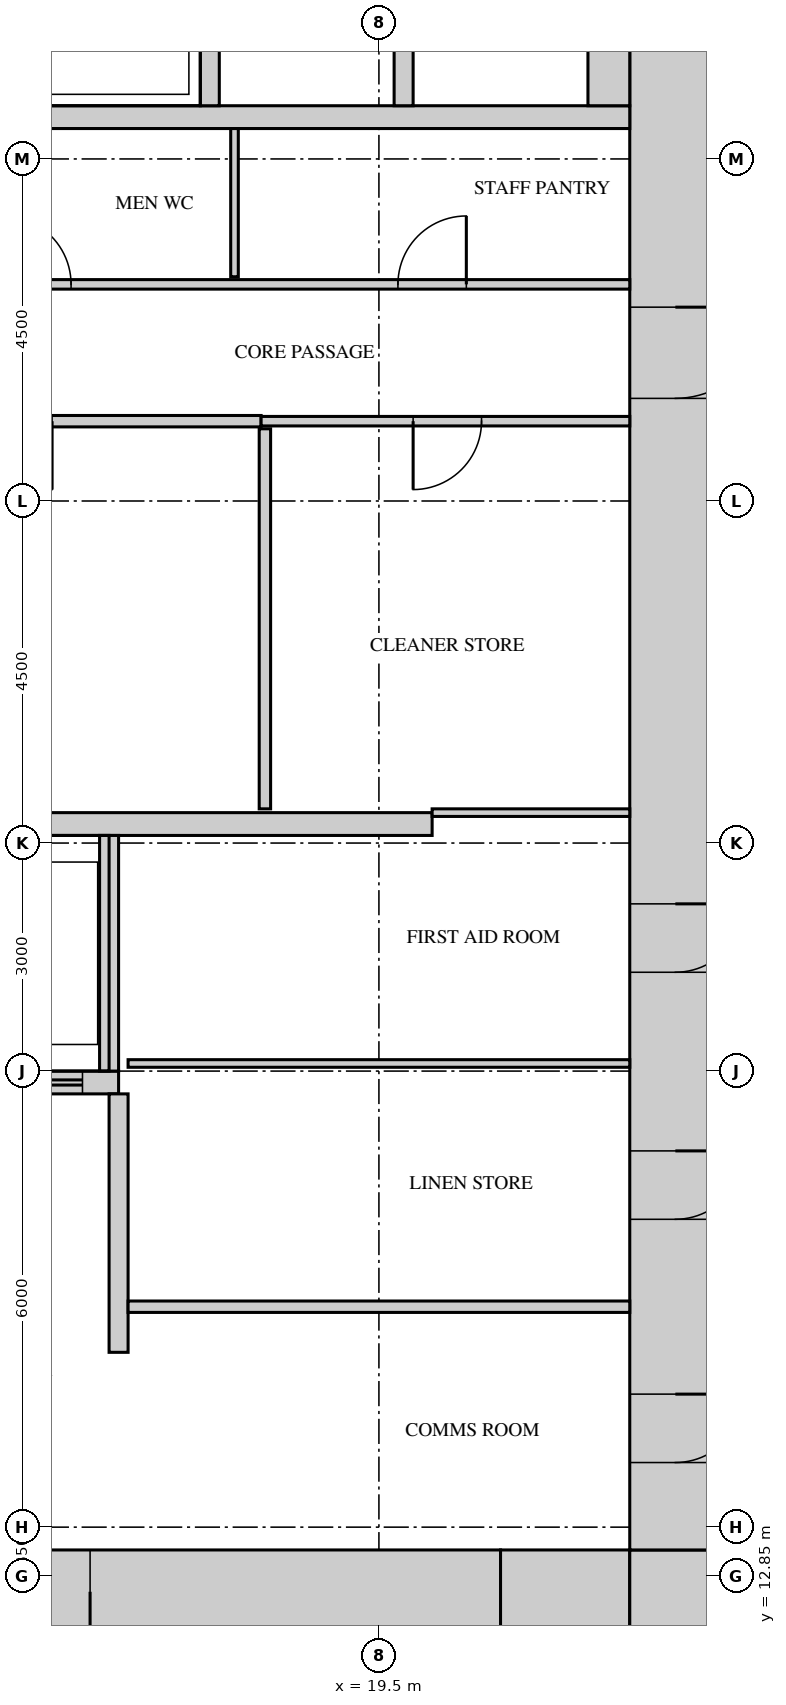
"""IFC4 building model, lengths in metres.
Left out: names, types, materials, properties, quantities, classifications, styles, units other than length and angle.
Written with IfcOpenShell. Run it as: python <this file> out.ifc"""

import sys

from ifc_helpers import new_model, si_unit, direction, frame, frame_2d, origin, place, context, subcontext, project, spatial, rectangle, extrude, source, transform, mapped, element, fill, save


model = new_model("IFC4")
c1 = context("Model", 3, precision=1e-05, world=origin(), true_north=direction((0.0, 1.0)))
c2 = subcontext(c1, "Body", "Model", "MODEL_VIEW")
j1 = project(units=[si_unit("LENGTHUNIT", "METRE"), si_unit("PLANEANGLEUNIT", "RADIAN")], contexts=[c1])
p1 = place(None, origin())
s1 = spatial("IfcSite", under=j1, at=p1, CompositionType="ELEMENT")
p2 = place(p1, origin())
s2 = spatial("IfcBuilding", under=s1, at=p2, CompositionType="ELEMENT")
p3 = place(p2, frame((0.0, 0.0, 46.5)))
s3 = spatial("IfcBuildingStorey", under=s2, at=p3, CompositionType="ELEMENT", Elevation=46.5)
m1 = source(origin(), c2, "Body", "SweptSolid", [
    extrude(rectangle(XDim=7.2, YDim=1.1, at=frame_2d((3.6, 0.0))), origin(), (0.0, 0.0, 1.0), 4.2),
])
p4 = place(p3, frame((13.9, 12.65, 0.0), z_axis=(0.0, 0.0, 1.0), x_axis=(1.0, 0.0, 0.0)))
e1 = element("IfcWall", 1, at=p4, inside=s3, PredefinedType="SHEAR", context=c2, shape_type="MappedRepresentation", body=[
    mapped(m1, transform((0.0, 0.0, 0.0))),
])
m2 = source(origin(), c2, "Body", "SweptSolid", [
    extrude(rectangle(XDim=1.0, YDim=2.1, at=frame_2d((0.5, 1.05))), frame((0.0, 0.56, 0.0), z_axis=(0.0, -1.0, 0.0), x_axis=(1.0, 0.0, 0.0)), (0.0, 0.0, 1.0), 1.12),
])
p5 = place(p4, frame((0.8, 0.0, 0.0)))
e2 = element("IfcOpeningElement", 2, at=p5, cuts=e1, PredefinedType="OPENING", context=c2, shape_type="MappedRepresentation", body=[
    mapped(m2, transform((0.0, 0.0, 0.0))),
])
m3 = source(origin(), c2, "Body", "SweptSolid", [
    extrude(rectangle(XDim=1.7, YDim=1.2, at=frame_2d((0.85, 0.0))), origin(), (0.0, 0.0, 1.0), 4.2),
])
p6 = place(p3, frame((21.1, 12.6, 0.0), z_axis=(0.0, 0.0, 1.0), x_axis=(1.0, 0.0, 0.0)))
e3 = element("IfcWall", 3, at=p6, inside=s3, PredefinedType="SHEAR", context=c2, shape_type="MappedRepresentation", body=[
    mapped(m3, transform((0.0, 0.0, 0.0))),
])
m4 = source(origin(), c2, "Body", "SweptSolid", [
    extrude(rectangle(XDim=1.2, YDim=1.2, at=frame_2d((0.6, 0.0))), origin(), (0.0, 0.0, 1.0), 4.2),
])
p7 = place(p3, frame((22.8, 12.6, 0.0), z_axis=(0.0, 0.0, 1.0), x_axis=(1.0, 0.0, 0.0)))
e4 = element("IfcWall", 4, at=p7, inside=s3, PredefinedType="SHEAR", context=c2, shape_type="MappedRepresentation", body=[
    mapped(m4, transform((0.0, 0.0, 0.0))),
])
m5 = source(origin(), c2, "Body", "SweptSolid", [
    extrude(rectangle(XDim=27.6, YDim=1.2, at=frame_2d((13.8, 0.0))), origin(), (0.0, 0.0, 1.0), 4.2),
])
p8 = place(p3, frame((23.4, 13.2, 0.0), z_axis=(0.0, 0.0, 1.0), x_axis=(0.0, 1.0, 0.0)))
e5 = element("IfcWall", 5, at=p8, inside=s3, PredefinedType="SHEAR", context=c2, shape_type="MappedRepresentation", body=[
    mapped(m5, transform((0.0, 0.0, 0.0))),
])
m6 = source(origin(), c2, "Body", "SweptSolid", [
    extrude(rectangle(XDim=1.8, YDim=2.1, at=frame_2d((0.9, 1.05))), frame((0.0, 0.61, 0.0), z_axis=(0.0, -1.0, 0.0), x_axis=(1.0, 0.0, 0.0)), (0.0, 0.0, 1.0), 1.22),
])
p9 = place(p8, frame((22.4, 0.0, 0.0)))
e6 = element("IfcOpeningElement", 6, at=p9, cuts=e5, PredefinedType="OPENING", context=c2, shape_type="MappedRepresentation", body=[
    mapped(m6, transform((0.0, 0.0, 0.0))),
])
m7 = source(origin(), c2, "Body", "SweptSolid", [
    extrude(rectangle(XDim=1.2, YDim=2.1, at=frame_2d((0.6, 1.05))), frame((0.0, 0.61, 0.0), z_axis=(0.0, -1.0, 0.0), x_axis=(1.0, 0.0, 0.0)), (0.0, 0.0, 1.0), 1.22),
])
p10 = place(p8, frame((15.15, 0.0, 0.0)))
e7 = element("IfcOpeningElement", 7, at=p10, cuts=e5, PredefinedType="OPENING", context=c2, shape_type="MappedRepresentation", body=[
    mapped(m7, transform((0.0, 0.0, 0.0))),
])
m8 = source(origin(), c2, "Body", "SweptSolid", [
    extrude(rectangle(XDim=0.9, YDim=2.1, at=frame_2d((0.45, 1.05))), frame((0.0, 0.61, 0.0), z_axis=(0.0, -1.0, 0.0), x_axis=(1.0, 0.0, 0.0)), (0.0, 0.0, 1.0), 1.22),
])
p11 = place(p8, frame((1.15, 0.0, 0.0)))
e8 = element("IfcOpeningElement", 8, at=p11, cuts=e5, PredefinedType="OPENING", context=c2, shape_type="MappedRepresentation", body=[
    mapped(m8, transform((0.0, 0.0, 0.0))),
])
p12 = place(p8, frame((4.35, 0.0, 0.0)))
e9 = element("IfcOpeningElement", 9, at=p12, cuts=e5, PredefinedType="OPENING", context=c2, shape_type="MappedRepresentation", body=[
    mapped(m8, transform((0.0, 0.0, 0.0))),
])
p13 = place(p8, frame((7.6, 0.0, 0.0)))
e10 = element("IfcOpeningElement", 10, at=p13, cuts=e5, PredefinedType="OPENING", context=c2, shape_type="MappedRepresentation", body=[
    mapped(m8, transform((0.0, 0.0, 0.0))),
])
m9 = source(origin(), c2, "Body", "SweptSolid", [
    extrude(rectangle(XDim=13.0, YDim=0.3, at=frame_2d((6.5, 0.0))), origin(), (0.0, 0.0, 1.0), 4.2),
])
p14 = place(p3, frame((7.2, 22.75, 0.0), z_axis=(0.0, 0.0, 1.0), x_axis=(1.0, 0.0, 0.0)))
e11 = element("IfcWall", 11, at=p14, inside=s3, PredefinedType="STANDARD", context=c2, shape_type="MappedRepresentation", body=[
    mapped(m9, transform((0.0, 0.0, 0.0))),
])
m10 = source(origin(), c2, "Body", "SweptSolid", [
    extrude(rectangle(XDim=8.875, YDim=0.3, at=frame_2d((4.438, 0.0))), origin(), (0.0, 0.0, 1.0), 4.2),
])
p15 = place(p3, frame((7.2, 19.35, 0.0), z_axis=(0.0, 0.0, 1.0), x_axis=(1.0, 0.0, 0.0)))
e12 = element("IfcWall", 12, at=p15, inside=s3, PredefinedType="STANDARD", context=c2, shape_type="MappedRepresentation", body=[
    mapped(m10, transform((0.0, 0.0, 0.0))),
])
m11 = source(origin(), c2, "Body", "SweptSolid", [
    extrude(rectangle(XDim=1.2, YDim=2.1, at=frame_2d((0.6, 1.05))), frame((0.0, 0.16, 0.0), z_axis=(0.0, -1.0, 0.0), x_axis=(1.0, 0.0, 0.0)), (0.0, 0.0, 1.0), 0.32),
])
p16 = place(p15, frame((0.45, 0.0, 0.0)))
e13 = element("IfcOpeningElement", 13, at=p16, cuts=e12, PredefinedType="OPENING", context=c2, shape_type="MappedRepresentation", body=[
    mapped(m11, transform((0.0, 0.0, 0.0))),
])
p17 = place(p15, frame((2.8, 0.0, 0.0)))
e14 = element("IfcOpeningElement", 14, at=p17, cuts=e12, PredefinedType="OPENING", context=c2, shape_type="MappedRepresentation", body=[
    mapped(m11, transform((0.0, 0.0, 0.0))),
])
p18 = place(p15, frame((5.05, 0.0, 0.0)))
e15 = element("IfcOpeningElement", 15, at=p18, cuts=e12, PredefinedType="OPENING", context=c2, shape_type="MappedRepresentation", body=[
    mapped(m11, transform((0.0, 0.0, 0.0))),
])
p19 = place(p15, frame((7.2, 0.0, 0.0)))
e16 = element("IfcOpeningElement", 16, at=p19, cuts=e12, PredefinedType="OPENING", context=c2, shape_type="MappedRepresentation", body=[
    mapped(m11, transform((0.0, 0.0, 0.0))),
])
m12 = source(origin(), c2, "Body", "SweptSolid", [
    extrude(rectangle(XDim=15.6, YDim=0.3, at=frame_2d((7.8, 0.0))), origin(), (0.0, 0.0, 1.0), 4.2),
])
p20 = place(p3, frame((7.2, 32.05, 0.0), z_axis=(0.0, 0.0, 1.0), x_axis=(1.0, 0.0, 0.0)))
e17 = element("IfcWall", 17, at=p20, inside=s3, PredefinedType="STANDARD", context=c2, shape_type="MappedRepresentation", body=[
    mapped(m12, transform((0.0, 0.0, 0.0))),
])
m13 = source(origin(), c2, "Body", "SweptSolid", [
    extrude(rectangle(XDim=3.1, YDim=0.25, at=frame_2d((1.55, 0.0))), origin(), (0.0, 0.0, 1.0), 4.2),
])
p21 = place(p3, frame((15.95, 19.5, 0.0), z_axis=(0.0, 0.0, 1.0), x_axis=(0.0, 1.0, 0.0)))
e18 = element("IfcWall", 18, at=p21, inside=s3, PredefinedType="STANDARD", context=c2, shape_type="MappedRepresentation", body=[
    mapped(m13, transform((0.0, 0.0, 0.0))),
])
m14 = source(origin(), c2, "Body", "SweptSolid", [
    extrude(rectangle(XDim=2.4, YDim=0.25, at=frame_2d((1.2, 0.0))), origin(), (0.0, 0.0, 1.0), 4.2),
])
for number, where, z_axis, x_axis in (
    (19, (17.275, 32.2, 0.0), (0.0, 0.0, 1.0), (0.0, 1.0, 0.0)),
    (20, (19.825, 32.2, 0.0), (0.0, 0.0, 1.0), (0.0, 1.0, 0.0)),
):
    element("IfcWall", number, at=place(p3, frame(where, z_axis=z_axis, x_axis=x_axis)), inside=s3, PredefinedType="STANDARD", context=c2, shape_type="MappedRepresentation", body=[
        mapped(m14, transform((0.0, 0.0, 0.0))),
    ])
m15 = source(origin(), c2, "Body", "SweptSolid", [
    extrude(rectangle(XDim=2.4, YDim=0.55, at=frame_2d((1.2, 0.0))), origin(), (0.0, 0.0, 1.0), 4.2),
])
p22 = place(p3, frame((22.525, 32.2, 0.0), z_axis=(0.0, 0.0, 1.0), x_axis=(0.0, 1.0, 0.0)))
e21 = element("IfcWall", 21, at=p22, inside=s3, PredefinedType="STANDARD", context=c2, shape_type="MappedRepresentation", body=[
    mapped(m15, transform((0.0, 0.0, 0.0))),
])
m16 = source(origin(), c2, "Body", "SweptSolid", [
    extrude(rectangle(XDim=3.4, YDim=0.25, at=frame_2d((1.7, 0.0))), origin(), (0.0, 0.0, 1.0), 4.2),
])
p23 = place(p3, frame((16.075, 15.8, 0.0), z_axis=(0.0, 0.0, 1.0), x_axis=(0.0, 1.0, 0.0)))
e22 = element("IfcWall", 22, at=p23, inside=s3, PredefinedType="STANDARD", context=c2, shape_type="MappedRepresentation", body=[
    mapped(m16, transform((0.0, 0.0, 0.0))),
])
m17 = source(origin(), c2, "Body", "SweptSolid", [
    extrude(rectangle(XDim=6.6, YDim=0.15, at=frame_2d((3.3, 0.0))), origin(), (0.0, 0.0, 1.0), 4.3),
])
p24 = place(p3, frame((16.2, 16.4, 0.0), z_axis=(0.0, 0.0, 1.0), x_axis=(1.0, 0.0, 0.0)))
e23 = element("IfcWall", 23, at=p24, inside=s3, PredefinedType="PARTITIONING", context=c2, shape_type="MappedRepresentation", body=[
    mapped(m17, transform((0.0, 0.0, 0.0))),
])
m18 = source(origin(), c2, "Body", "SweptSolid", [
    extrude(rectangle(XDim=6.6, YDim=0.1, at=frame_2d((3.3, 0.0))), origin(), (0.0, 0.0, 1.0), 4.3),
])
p25 = place(p3, frame((16.2, 19.6, 0.0), z_axis=(0.0, 0.0, 1.0), x_axis=(1.0, 0.0, 0.0)))
e24 = element("IfcWall", 24, at=p25, inside=s3, PredefinedType="PARTITIONING", context=c2, shape_type="MappedRepresentation", body=[
    mapped(m18, transform((0.0, 0.0, 0.0))),
])
m19 = source(origin(), c2, "Body", "SweptSolid", [
    extrude(rectangle(XDim=2.6, YDim=0.1, at=frame_2d((1.3, 0.0))), origin(), (0.0, 0.0, 1.0), 4.3),
])
p26 = place(p3, frame((20.2, 22.9, 0.0), z_axis=(0.0, 0.0, 1.0), x_axis=(1.0, 0.0, 0.0)))
e25 = element("IfcWall", 25, at=p26, inside=s3, PredefinedType="PARTITIONING", context=c2, shape_type="MappedRepresentation", body=[
    mapped(m19, transform((0.0, 0.0, 0.0))),
])
m20 = source(origin(), c2, "Body", "SweptSolid", [
    extrude(rectangle(XDim=5.0, YDim=0.15, at=frame_2d((2.5, 0.0))), origin(), (0.0, 0.0, 1.0), 4.3),
])
p27 = place(p3, frame((18.0, 22.95, 0.0), z_axis=(0.0, 0.0, 1.0), x_axis=(0.0, 1.0, 0.0)))
e26 = element("IfcWall", 26, at=p27, inside=s3, PredefinedType="PARTITIONING", context=c2, shape_type="MappedRepresentation", body=[
    mapped(m20, transform((0.0, 0.0, 0.0))),
])
m21 = source(origin(), c2, "Body", "SweptSolid", [
    extrude(rectangle(XDim=6.4, YDim=0.15, at=frame_2d((3.2, 0.0))), origin(), (0.0, 0.0, 1.0), 4.3),
])
p28 = place(p3, frame((11.55, 28.05, 0.0), z_axis=(0.0, 0.0, 1.0), x_axis=(1.0, 0.0, 0.0)))
e27 = element("IfcWall", 27, at=p28, inside=s3, PredefinedType="PARTITIONING", context=c2, shape_type="MappedRepresentation", body=[
    mapped(m21, transform((0.0, 0.0, 0.0))),
])
m22 = source(origin(), c2, "Body", "SweptSolid", [
    extrude(rectangle(XDim=0.9, YDim=2.1, at=frame_2d((0.45, 1.05))), frame((0.0, 0.085, 0.0), z_axis=(0.0, -1.0, 0.0), x_axis=(1.0, 0.0, 0.0)), (0.0, 0.0, 1.0), 0.17),
])
p29 = place(p28, frame((2.75, 0.0, 0.0)))
e28 = element("IfcOpeningElement", 28, at=p29, cuts=e27, PredefinedType="OPENING", context=c2, shape_type="MappedRepresentation", body=[
    mapped(m22, transform((0.0, 0.0, 0.0))),
])
m23 = source(origin(), c2, "Body", "SweptSolid", [
    extrude(rectangle(XDim=4.85, YDim=0.125, at=frame_2d((2.425, 0.0))), origin(), (0.0, 0.0, 1.0), 4.3),
])
p30 = place(p3, frame((17.95, 28.05, 0.0), z_axis=(0.0, 0.0, 1.0), x_axis=(1.0, 0.0, 0.0)))
e29 = element("IfcWall", 29, at=p30, inside=s3, PredefinedType="PARTITIONING", context=c2, shape_type="MappedRepresentation", body=[
    mapped(m23, transform((0.0, 0.0, 0.0))),
])
m24 = source(origin(), c2, "Body", "SweptSolid", [
    extrude(rectangle(XDim=0.9, YDim=2.1, at=frame_2d((0.45, 1.05))), frame((0.0, 0.073, 0.0), z_axis=(0.0, -1.0, 0.0), x_axis=(1.0, 0.0, 0.0)), (0.0, 0.0, 1.0), 0.145),
])
p31 = place(p30, frame((2.0, 0.0, 0.0)))
e30 = element("IfcOpeningElement", 30, at=p31, cuts=e29, PredefinedType="OPENING", context=c2, shape_type="MappedRepresentation", body=[
    mapped(m24, transform((0.0, 0.0, 0.0))),
])
m25 = source(origin(), c2, "Body", "SweptSolid", [
    extrude(rectangle(XDim=15.6, YDim=0.125, at=frame_2d((7.8, 0.0))), origin(), (0.0, 0.0, 1.0), 4.3),
])
p32 = place(p3, frame((7.2, 29.85, 0.0), z_axis=(0.0, 0.0, 1.0), x_axis=(1.0, 0.0, 0.0)))
e31 = element("IfcWall", 31, at=p32, inside=s3, PredefinedType="PARTITIONING", context=c2, shape_type="MappedRepresentation", body=[
    mapped(m25, transform((0.0, 0.0, 0.0))),
])
p33 = place(p32, frame((2.15, 0.0, 0.0)))
e32 = element("IfcOpeningElement", 32, at=p33, cuts=e31, PredefinedType="OPENING", context=c2, shape_type="MappedRepresentation", body=[
    mapped(m24, transform((0.0, 0.0, 0.0))),
])
p34 = place(p32, frame((7.35, 0.0, 0.0)))
e33 = element("IfcOpeningElement", 33, at=p34, cuts=e31, PredefinedType="OPENING", context=c2, shape_type="MappedRepresentation", body=[
    mapped(m24, transform((0.0, 0.0, 0.0))),
])
p35 = place(p32, frame((12.55, 0.0, 0.0)))
e34 = element("IfcOpeningElement", 34, at=p35, cuts=e31, PredefinedType="OPENING", context=c2, shape_type="MappedRepresentation", body=[
    mapped(m24, transform((0.0, 0.0, 0.0))),
])
m26 = source(origin(), c2, "Body", "SweptSolid", [
    extrude(rectangle(XDim=1.95, YDim=0.1, at=frame_2d((0.975, 0.0))), origin(), (0.0, 0.0, 1.0), 4.3),
])
p36 = place(p3, frame((17.6, 29.95, 0.0), z_axis=(0.0, 0.0, 1.0), x_axis=(0.0, 1.0, 0.0)))
e35 = element("IfcWall", 35, at=p36, inside=s3, PredefinedType="PARTITIONING", context=c2, shape_type="MappedRepresentation", body=[
    mapped(m26, transform((0.0, 0.0, 0.0))),
])
m27 = source(origin(), c2, "Body", "SweptSolid", [
    extrude(rectangle(XDim=1.2, YDim=2.1, at=frame_2d((0.6, 1.05))), frame((0.0, 0.55, 0.0), z_axis=(0.0, -1.0, 0.0), x_axis=(1.0, 0.0, 0.0)), (0.0, 0.0, 1.0), 1.1),
])
p37 = place(p10, origin())
e36 = element("IfcDoor", 36, at=p37, inside=s3, OperationType="SINGLE_SWING_RIGHT", PredefinedType="DOOR", context=c2, shape_type="MappedRepresentation", body=[
    mapped(m27, transform((0.0, 0.0, 0.0))),
])
fill(e7, e36)
m28 = source(origin(), c2, "Body", "SweptSolid", [
    extrude(rectangle(XDim=0.9, YDim=2.1, at=frame_2d((0.45, 1.05))), frame((0.0, 0.025, 0.0), z_axis=(0.0, -1.0, 0.0), x_axis=(1.0, 0.0, 0.0)), (0.0, 0.0, 1.0), 0.05),
])
p38 = place(p34, origin())
e37 = element("IfcDoor", 37, at=p38, inside=s3, OperationType="SINGLE_SWING_RIGHT", PredefinedType="DOOR", context=c2, shape_type="MappedRepresentation", body=[
    mapped(m28, transform((0.0, 0.0, 0.0))),
])
fill(e33, e37)
p39 = place(p35, origin())
e38 = element("IfcDoor", 38, at=p39, inside=s3, OperationType="SINGLE_SWING_LEFT", PredefinedType="DOOR", context=c2, shape_type="MappedRepresentation", body=[
    mapped(m28, transform((0.0, 0.0, 0.0))),
])
fill(e34, e38)
p40 = place(p31, origin())
e39 = element("IfcDoor", 39, at=p40, inside=s3, OperationType="SINGLE_SWING_LEFT", PredefinedType="DOOR", context=c2, shape_type="MappedRepresentation", body=[
    mapped(m28, transform((0.0, 0.0, 0.0))),
])
fill(e30, e39)
m29 = source(origin(), c2, "Body", "SweptSolid", [
    extrude(rectangle(XDim=0.9, YDim=2.1, at=frame_2d((0.45, 1.05))), frame((0.0, 0.55, 0.0), z_axis=(0.0, -1.0, 0.0), x_axis=(1.0, 0.0, 0.0)), (0.0, 0.0, 1.0), 1.1),
])
p41 = place(p11, origin())
e40 = element("IfcDoor", 40, at=p41, inside=s3, OperationType="SINGLE_SWING_RIGHT", PredefinedType="DOOR", context=c2, shape_type="MappedRepresentation", body=[
    mapped(m29, transform((0.0, 0.0, 0.0))),
])
fill(e8, e40)
p42 = place(p12, origin())
e41 = element("IfcDoor", 41, at=p42, inside=s3, OperationType="SINGLE_SWING_RIGHT", PredefinedType="DOOR", context=c2, shape_type="MappedRepresentation", body=[
    mapped(m29, transform((0.0, 0.0, 0.0))),
])
fill(e9, e41)
p43 = place(p13, origin())
e42 = element("IfcDoor", 42, at=p43, inside=s3, OperationType="SINGLE_SWING_RIGHT", PredefinedType="DOOR", context=c2, shape_type="MappedRepresentation", body=[
    mapped(m29, transform((0.0, 0.0, 0.0))),
])
fill(e10, e42)
m30 = source(origin(), c2, "Body", "SweptSolid", [
    extrude(rectangle(XDim=1.0, YDim=2.1, at=frame_2d((0.5, 1.05))), frame((0.0, 0.5, 0.0), z_axis=(0.0, -1.0, 0.0), x_axis=(1.0, 0.0, 0.0)), (0.0, 0.0, 1.0), 1.0),
])
p44 = place(p5, origin())
e43 = element("IfcDoor", 43, at=p44, inside=s3, OperationType="SINGLE_SWING_RIGHT", PredefinedType="DOOR", context=c2, shape_type="MappedRepresentation", body=[
    mapped(m30, transform((0.0, 0.0, 0.0))),
])
fill(e2, e43)
m31 = source(origin(), c2, "Body", "SweptSolid", [
    extrude(rectangle(XDim=1.2, YDim=2.1, at=frame_2d((0.6, 1.05))), frame((0.0, 0.025, 0.0), z_axis=(0.0, -1.0, 0.0), x_axis=(1.0, 0.0, 0.0)), (0.0, 0.0, 1.0), 0.05),
])
p45 = place(p19, origin())
e44 = element("IfcDoor", 44, at=p45, inside=s3, OperationType="DOUBLE_DOOR_SLIDING", PredefinedType="DOOR", context=c2, shape_type="MappedRepresentation", body=[
    mapped(m31, transform((0.0, 0.0, 0.0))),
])
fill(e16, e44)
save(model, sys.argv[1])
